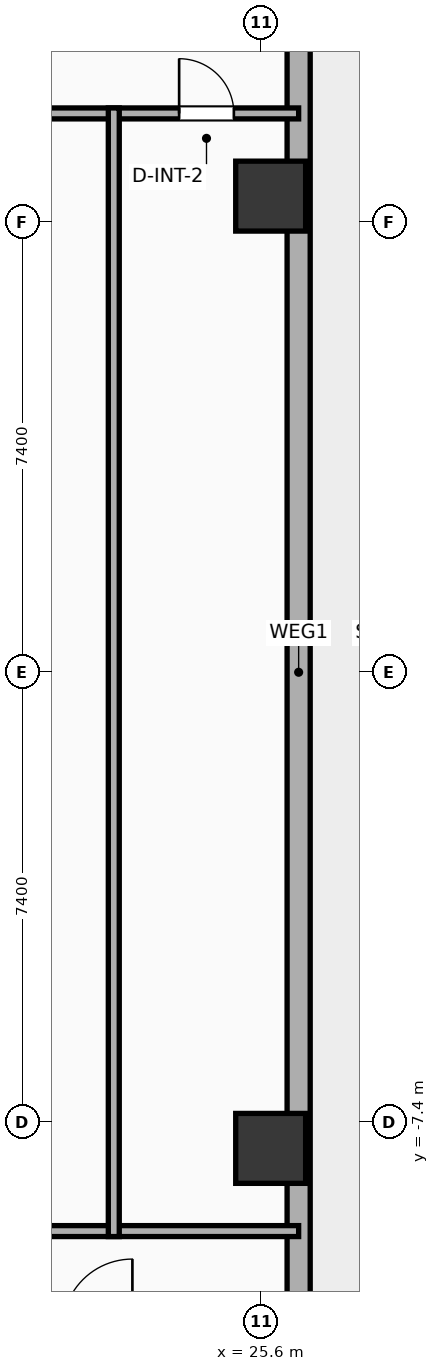
"""IFC4 building model, lengths in metres.
Left out: names, types, materials, properties, quantities, classifications, styles, units other than length and angle.
Written with IfcOpenShell. Run it as: python <this file> out.ifc"""

import sys

from ifc_helpers import new_model, si_unit, direction, frame, frame_2d, origin, origin_2d, place, context, subcontext, project, spatial, rectangle, hollow_rectangle, extrude, element, fill, save


model = new_model("IFC4")
c1 = context("Model", 3, precision=1e-05, world=origin(), true_north=direction((0.0, 1.0)))
c2 = subcontext(c1, "Body", "Model", "MODEL_VIEW")
j1 = project(units=[si_unit("LENGTHUNIT", "METRE"), si_unit("PLANEANGLEUNIT", "RADIAN")], contexts=[c1])
p1 = place(None, origin())
s1 = spatial("IfcSite", under=j1, at=p1, CompositionType="ELEMENT")
p2 = place(p1, origin())
s2 = spatial("IfcBuilding", under=s1, at=p2, CompositionType="ELEMENT")
p3 = place(p2, frame((0.0, 0.0, 53.3)))
s3 = spatial("IfcBuildingStorey", under=s2, at=p3, CompositionType="ELEMENT", Elevation=53.3)
for number, where, z_axis, x_axis in (
    (1, (25.75, -7.83, 0.0), (0.0, 0.0, 1.0), (1.0, 0.0, 0.0)),
    (2, (25.75, 7.83, 0.0), (0.0, 0.0, 1.0), (1.0, 0.0, 0.0)),
):
    element("IfcColumn", number, at=place(p3, frame(where, z_axis=z_axis, x_axis=x_axis)), inside=s3, PredefinedType="COLUMN", context=c2, shape_type="SweptSolid", body=[
        extrude(hollow_rectangle(XDim=1.15, YDim=1.15, WallThickness=0.04, at=origin_2d()), origin(), (0.0, 0.0, 1.0), 3.9),
    ])
p4 = place(p3, frame((26.21, 18.381, 0.0), z_axis=(0.0, 0.0, 1.0), x_axis=(0.0, -1.0, 0.0)))
e3 = element("IfcWall", 3, at=p4, inside=s3, PredefinedType="ELEMENTEDWALL", context=c2, shape_type="SweptSolid", body=[
    extrude(rectangle(XDim=36.763, YDim=0.38, at=frame_2d((18.381, 0.0))), origin(), (0.0, 0.0, 1.0), 3.65),
])
p5 = place(p4, frame((33.537, 0.0, 0.75)))
e4 = element("IfcOpeningElement", 4, at=p5, cuts=e3, PredefinedType="OPENING", context=c2, shape_type="SweptSolid", body=[
    extrude(rectangle(XDim=1.2, YDim=2.05, at=frame_2d((0.6, 1.025))), frame((0.0, 0.2, 0.0), z_axis=(0.0, -1.0, 0.0), x_axis=(1.0, 0.0, 0.0)), (0.0, 0.0, 1.0), 0.4),
])
p6 = place(p3, frame((9.88, 9.19, 0.0), z_axis=(0.0, 0.0, 1.0), x_axis=(1.0, 0.0, 0.0)))
e5 = element("IfcWall", 5, at=p6, inside=s3, PredefinedType="PARTITIONING", context=c2, shape_type="SweptSolid", body=[
    extrude(rectangle(XDim=16.33, YDim=0.18, at=frame_2d((8.165, 0.0))), origin(), (0.0, 0.0, 1.0), 3.65),
])
p7 = place(p6, frame((14.365, 0.0, 0.0)))
e6 = element("IfcOpeningElement", 6, at=p7, cuts=e5, PredefinedType="OPENING", context=c2, shape_type="SweptSolid", body=[
    extrude(rectangle(XDim=0.9, YDim=2.05, at=frame_2d((0.45, 1.025))), frame((0.0, 0.1, 0.0), z_axis=(0.0, -1.0, 0.0), x_axis=(1.0, 0.0, 0.0)), (0.0, 0.0, 1.0), 0.2),
])
p8 = place(p3, frame((9.88, -9.19, 0.0), z_axis=(0.0, 0.0, 1.0), x_axis=(1.0, 0.0, 0.0)))
e7 = element("IfcWall", 7, at=p8, inside=s3, PredefinedType="PARTITIONING", context=c2, shape_type="SweptSolid", body=[
    extrude(rectangle(XDim=16.33, YDim=0.18, at=frame_2d((8.165, 0.0))), origin(), (0.0, 0.0, 1.0), 3.65),
])
p9 = place(p3, frame((23.17, -9.28, 0.0), z_axis=(0.0, 0.0, 1.0), x_axis=(0.0, 1.0, 0.0)))
e8 = element("IfcWall", 8, at=p9, inside=s3, PredefinedType="PARTITIONING", context=c2, shape_type="SweptSolid", body=[
    extrude(rectangle(XDim=18.56, YDim=0.18, at=frame_2d((9.28, 0.0))), origin(), (0.0, 0.0, 1.0), 3.65),
])
p10 = place(p7, origin())
e9 = element("IfcDoor", 9, at=p10, inside=s3, OperationType="SINGLE_SWING_LEFT", PredefinedType="DOOR", context=c2, shape_type="SweptSolid", body=[
    extrude(rectangle(XDim=0.9, YDim=2.05, at=frame_2d((0.45, 1.025))), frame((0.0, 0.025, 0.0), z_axis=(0.0, -1.0, 0.0), x_axis=(1.0, 0.0, 0.0)), (0.0, 0.0, 1.0), 0.05),
])
fill(e6, e9)
save(model, sys.argv[1])
